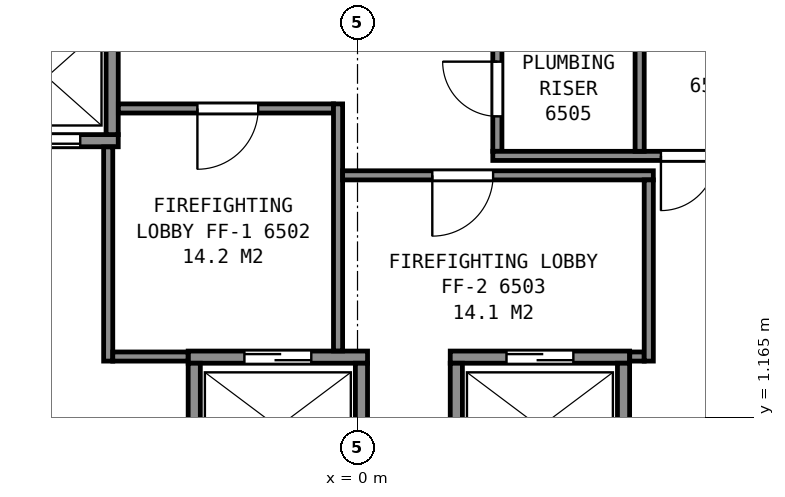
"""IFC4 building model, lengths in metres.
Left out: names, types, materials, properties, quantities, classifications, styles, units other than length and angle.
Written with IfcOpenShell. Run it as: python <this file> out.ifc"""

import sys

from ifc_helpers import new_model, si_unit, direction, frame, frame_2d, origin, origin_2d, place, context, subcontext, project, spatial, rectangle, i_section, extrude, element, fill, save


model = new_model("IFC4")
c1 = context("Model", 3, precision=1e-05, world=origin(), true_north=direction((0.0, 1.0)))
c2 = subcontext(c1, "Body", "Model", "MODEL_VIEW")
j1 = project(units=[si_unit("LENGTHUNIT", "METRE"), si_unit("PLANEANGLEUNIT", "RADIAN")], contexts=[c1])
p1 = place(None, origin())
s1 = spatial("IfcSite", under=j1, at=p1, CompositionType="ELEMENT")
p2 = place(p1, origin())
s2 = spatial("IfcBuilding", under=s1, at=p2, CompositionType="ELEMENT")
p3 = place(p2, frame((0.0, 0.0, 258.2)))
s3 = spatial("IfcBuildingStorey", under=s2, at=p3, CompositionType="ELEMENT", Elevation=258.2)
p4 = place(p3, frame((0.0, 7.994, 0.03), z_axis=(0.0, -0.202631772336, 0.979255005012), x_axis=(1.0, 0.0, 0.0)))
e1 = element("IfcColumn", 1, at=p4, inside=s3, PredefinedType="COLUMN", context=c2, shape_type="SweptSolid", body=[
    extrude(i_section(OverallWidth=0.399, OverallDepth=0.386, WebThickness=0.021, FlangeThickness=0.033, FilletRadius=0.015, at=origin_2d()), origin(), (0.0, 0.0, 1.0), 5.862),
])
p5 = place(p3, frame((-2.785, 2.15, 0.0), z_axis=(0.0, 0.0, 1.0), x_axis=(1.0, 0.0, 0.0)))
e2 = element("IfcWall", 2, at=p5, inside=s3, PredefinedType="PARTITIONING", context=c2, shape_type="SweptSolid", body=[
    extrude(rectangle(XDim=2.95, YDim=0.2, at=frame_2d((1.475, 0.0))), origin(), (0.0, 0.0, 1.0), 5.8),
])
p6 = place(p5, frame((0.925, 0.0, 0.0)))
e3 = element("IfcOpeningElement", 3, at=p6, cuts=e2, PredefinedType="OPENING", context=c2, shape_type="SweptSolid", body=[
    extrude(rectangle(XDim=1.1, YDim=2.1, at=frame_2d((0.55, 1.05))), frame((0.0, 0.11, 0.0), z_axis=(0.0, -1.0, 0.0), x_axis=(1.0, 0.0, 0.0)), (0.0, 0.0, 1.0), 0.22),
])
p7 = place(p3, frame((1.525, 2.15, 0.0), z_axis=(0.0, 0.0, 1.0), x_axis=(1.0, 0.0, 0.0)))
e4 = element("IfcWall", 4, at=p7, inside=s3, PredefinedType="PARTITIONING", context=c2, shape_type="SweptSolid", body=[
    extrude(rectangle(XDim=2.95, YDim=0.2, at=frame_2d((1.475, 0.0))), origin(), (0.0, 0.0, 1.0), 5.8),
])
p8 = place(p7, frame((0.925, 0.0, 0.0)))
e5 = element("IfcOpeningElement", 5, at=p8, cuts=e4, PredefinedType="OPENING", context=c2, shape_type="SweptSolid", body=[
    extrude(rectangle(XDim=1.1, YDim=2.1, at=frame_2d((0.55, 1.05))), frame((0.0, 0.11, 0.0), z_axis=(0.0, -1.0, 0.0), x_axis=(1.0, 0.0, 0.0)), (0.0, 0.0, 1.0), 0.22),
])
p9 = place(p3, frame((-6.285, 5.71, 0.0), z_axis=(0.0, 0.0, 1.0), x_axis=(1.0, 0.0, 0.0)))
e6 = element("IfcWall", 6, at=p9, inside=s3, PredefinedType="PARTITIONING", context=c2, shape_type="SweptSolid", body=[
    extrude(rectangle(XDim=2.35, YDim=0.2, at=frame_2d((1.175, 0.0))), origin(), (0.0, 0.0, 1.0), 5.55),
])
p10 = place(p9, frame((0.625, 0.0, 0.0)))
e7 = element("IfcOpeningElement", 7, at=p10, cuts=e6, PredefinedType="OPENING", context=c2, shape_type="SweptSolid", body=[
    extrude(rectangle(XDim=1.1, YDim=2.1, at=frame_2d((0.55, 1.05))), frame((0.0, 0.11, 0.0), z_axis=(0.0, -1.0, 0.0), x_axis=(1.0, 0.0, 0.0)), (0.0, 0.0, 1.0), 0.22),
])
p11 = place(p3, frame((5.663, -1.612, 0.0), z_axis=(0.0, 0.0, 1.0), x_axis=(0.49998122708, 0.866036242063, 0.0)))
e8 = element("IfcWall", 8, at=p11, inside=s3, PredefinedType="PARTITIONING", context=c2, shape_type="SweptSolid", body=[
    extrude(rectangle(XDim=4.9, YDim=0.2, at=frame_2d((2.45, 0.0))), origin(), (0.0, 0.0, 1.0), 5.55),
])
p12 = place(p11, frame((3.075, 0.0, 0.0)))
e9 = element("IfcOpeningElement", 9, at=p12, cuts=e8, PredefinedType="OPENING", context=c2, shape_type="SweptSolid", body=[
    extrude(rectangle(XDim=1.1, YDim=2.1, at=frame_2d((0.55, 1.05))), frame((0.0, 0.11, 0.0), z_axis=(0.0, -1.0, 0.0), x_axis=(1.0, 0.0, 0.0)), (0.0, 0.0, 1.0), 0.22),
])
p13 = place(p11, frame((0.725, 0.0, 0.0)))
e10 = element("IfcOpeningElement", 10, at=p13, cuts=e8, PredefinedType="OPENING", context=c2, shape_type="SweptSolid", body=[
    extrude(rectangle(XDim=1.1, YDim=2.1, at=frame_2d((0.55, 1.05))), frame((0.0, 0.11, 0.0), z_axis=(0.0, -1.0, 0.0), x_axis=(1.0, 0.0, 0.0)), (0.0, 0.0, 1.0), 0.22),
])
for number, where, z_axis, x_axis in (
    (11, (4.375, 0.1, 0.0), (0.0, 0.0, 1.0), (0.0, 1.0, 0.0)),
    (12, (1.625, 0.1, 0.0), (0.0, 0.0, 1.0), (0.0, 1.0, 0.0)),
    (13, (0.065, 0.1, 0.0), (0.0, 0.0, 1.0), (0.0, 1.0, 0.0)),
    (14, (-2.685, 0.1, 0.0), (0.0, 0.0, 1.0), (0.0, 1.0, 0.0)),
):
    element("IfcWall", number, at=place(p3, frame(where, z_axis=z_axis, x_axis=x_axis)), inside=s3, PredefinedType="PARTITIONING", context=c2, shape_type="SweptSolid", body=[
        extrude(rectangle(XDim=1.95, YDim=0.2, at=frame_2d((0.975, 0.0))), origin(), (0.0, 0.0, 1.0), 5.8),
    ])
p14 = place(p3, frame((-4.035, 5.81, 0.0), z_axis=(0.0, 0.0, 1.0), x_axis=(0.0, 1.0, 0.0)))
e15 = element("IfcWall", 15, at=p14, inside=s3, PredefinedType="PARTITIONING", context=c2, shape_type="SweptSolid", body=[
    extrude(rectangle(XDim=1.75, YDim=0.2, at=frame_2d((0.875, 0.0))), origin(), (0.0, 0.0, 1.0), 4.897),
])
p15 = place(p3, frame((-4.1, 2.085, 0.0), z_axis=(0.0, 0.0, 1.0), x_axis=(0.0, 1.0, 0.0)))
e16 = element("IfcWall", 16, at=p15, inside=s3, PredefinedType="PARTITIONING", context=c2, shape_type="SweptSolid", body=[
    extrude(rectangle(XDim=3.523, YDim=0.15, at=frame_2d((1.761, 0.0))), origin(), (0.0, 0.0, 1.0), 5.55),
])
p16 = place(p3, frame((-4.025, 2.16, 0.0), z_axis=(0.0, 0.0, 1.0), x_axis=(1.0, 0.0, 0.0)))
e17 = element("IfcWall", 17, at=p16, inside=s3, PredefinedType="PARTITIONING", context=c2, shape_type="SweptSolid", body=[
    extrude(rectangle(XDim=1.238, YDim=0.15, at=frame_2d((0.619, 0.0))), origin(), (0.0, 0.0, 1.0), 5.55),
])
p17 = place(p3, frame((-3.933, 6.24, 0.0), z_axis=(0.0, 0.0, 1.0), x_axis=(1.0, 0.0, 0.0)))
e18 = element("IfcWall", 18, at=p17, inside=s3, PredefinedType="PARTITIONING", context=c2, shape_type="SweptSolid", body=[
    extrude(rectangle(XDim=3.538, YDim=0.15, at=frame_2d((1.769, 0.0))), origin(), (0.0, 0.0, 1.0), 5.55),
])
p18 = place(p17, frame((1.3, 0.0, 0.0)))
e19 = element("IfcOpeningElement", 19, at=p18, cuts=e18, PredefinedType="OPENING", context=c2, shape_type="SweptSolid", body=[
    extrude(rectangle(XDim=1.0, YDim=2.1, at=frame_2d((0.5, 1.05))), frame((0.0, 0.085, 0.0), z_axis=(0.0, -1.0, 0.0), x_axis=(1.0, 0.0, 0.0)), (0.0, 0.0, 1.0), 0.17),
])
p19 = place(p3, frame((-0.32, 2.252, 0.0), z_axis=(0.0, 0.0, 1.0), x_axis=(0.0, 1.0, 0.0)))
e20 = element("IfcWall", 20, at=p19, inside=s3, PredefinedType="PARTITIONING", context=c2, shape_type="SweptSolid", body=[
    extrude(rectangle(XDim=4.063, YDim=0.15, at=frame_2d((2.031, 0.0))), origin(), (0.0, 0.0, 1.0), 5.55),
])
p20 = place(p3, frame((-0.245, 5.14, 0.0), z_axis=(0.0, 0.0, 1.0), x_axis=(1.0, 0.0, 0.0)))
e21 = element("IfcWall", 21, at=p20, inside=s3, PredefinedType="PARTITIONING", context=c2, shape_type="SweptSolid", body=[
    extrude(rectangle(XDim=5.11, YDim=0.15, at=frame_2d((2.555, 0.0))), origin(), (0.0, 0.0, 1.0), 5.55),
])
p21 = place(p20, frame((1.475, 0.0, 0.0)))
e22 = element("IfcOpeningElement", 22, at=p21, cuts=e21, PredefinedType="OPENING", context=c2, shape_type="SweptSolid", body=[
    extrude(rectangle(XDim=1.0, YDim=2.1, at=frame_2d((0.5, 1.05))), frame((0.0, 0.085, 0.0), z_axis=(0.0, -1.0, 0.0), x_axis=(1.0, 0.0, 0.0)), (0.0, 0.0, 1.0), 0.17),
])
p22 = place(p3, frame((2.3, 7.56, 0.0), z_axis=(0.0, 0.0, 1.0), x_axis=(0.0, -1.0, 0.0)))
e23 = element("IfcWall", 23, at=p22, inside=s3, PredefinedType="PARTITIONING", context=c2, shape_type="SweptSolid", body=[
    extrude(rectangle(XDim=2.025, YDim=0.15, at=frame_2d((1.013, 0.0))), origin(), (0.0, 0.0, 1.0), 4.933),
])
p23 = place(p22, frame((0.55, 0.0, 0.0)))
e24 = element("IfcOpeningElement", 24, at=p23, cuts=e23, PredefinedType="OPENING", context=c2, shape_type="SweptSolid", body=[
    extrude(rectangle(XDim=0.9, YDim=2.1, at=frame_2d((0.45, 1.05))), frame((0.0, 0.085, 0.0), z_axis=(0.0, -1.0, 0.0), x_axis=(1.0, 0.0, 0.0)), (0.0, 0.0, 1.0), 0.17),
])
p24 = place(p3, frame((2.225, 5.46, 0.0), z_axis=(0.0, 0.0, 1.0), x_axis=(1.0, 0.0, 0.0)))
e25 = element("IfcWall", 25, at=p24, inside=s3, PredefinedType="PARTITIONING", context=c2, shape_type="SweptSolid", body=[
    extrude(rectangle(XDim=3.916, YDim=0.15, at=frame_2d((1.958, 0.0))), origin(), (0.0, 0.0, 1.0), 5.55),
])
p25 = place(p24, frame((2.765, 0.0, 0.0)))
e26 = element("IfcOpeningElement", 26, at=p25, cuts=e25, PredefinedType="OPENING", context=c2, shape_type="SweptSolid", body=[
    extrude(rectangle(XDim=0.9, YDim=2.1, at=frame_2d((0.45, 1.05))), frame((0.0, 0.085, 0.0), z_axis=(0.0, -1.0, 0.0), x_axis=(1.0, 0.0, 0.0)), (0.0, 0.0, 1.0), 0.17),
])
p26 = place(p3, frame((4.477, 2.16, 0.0), z_axis=(0.0, 0.0, 1.0), x_axis=(1.0, 0.0, 0.0)))
e27 = element("IfcWall", 27, at=p26, inside=s3, PredefinedType="PARTITIONING", context=c2, shape_type="SweptSolid", body=[
    extrude(rectangle(XDim=0.238, YDim=0.15, at=frame_2d((0.119, 0.0))), origin(), (0.0, 0.0, 1.0), 5.55),
])
p27 = place(p3, frame((4.64, 5.535, 0.0), z_axis=(0.0, 0.0, 1.0), x_axis=(0.0, 1.0, 0.0)))
e28 = element("IfcWall", 28, at=p27, inside=s3, PredefinedType="PARTITIONING", context=c2, shape_type="SweptSolid", body=[
    extrude(rectangle(XDim=2.025, YDim=0.15, at=frame_2d((1.013, 0.0))), origin(), (0.0, 0.0, 1.0), 4.933),
])
p28 = place(p3, frame((4.79, 2.085, 0.0), z_axis=(0.0, 0.0, 1.0), x_axis=(0.0, 1.0, 0.0)))
e29 = element("IfcWall", 29, at=p28, inside=s3, PredefinedType="PARTITIONING", context=c2, shape_type="SweptSolid", body=[
    extrude(rectangle(XDim=2.98, YDim=0.15, at=frame_2d((1.49, 0.0))), origin(), (0.0, 0.0, 1.0), 5.55),
])
p29 = place(p3, frame((-13.605, 3.965, 0.0), z_axis=(0.0, 0.0, 1.0), x_axis=(0.499986289957, -0.866033319137, 0.0)))
e30 = element("IfcWall", 30, at=p29, inside=s3, PredefinedType="PARTITIONING", context=c2, shape_type="SweptSolid", body=[
    extrude(rectangle(XDim=19.731, YDim=0.125, at=frame_2d((9.866, 0.0))), origin(), (0.0, 0.0, 1.0), 4.462),
])
p30 = place(p3, frame((13.605, 3.965, 0.0), z_axis=(0.0, 0.0, 1.0), x_axis=(-0.499986289957, -0.866033319137, 0.0)))
e31 = element("IfcWall", 31, at=p30, inside=s3, PredefinedType="PARTITIONING", context=c2, shape_type="SweptSolid", body=[
    extrude(rectangle(XDim=19.731, YDim=0.125, at=frame_2d((9.866, 0.0))), origin(), (0.0, 0.0, 1.0), 4.462),
])
p31 = place(p30, frame((9.269, 0.0, 0.0)))
e32 = element("IfcOpeningElement", 32, at=p31, cuts=e31, PredefinedType="OPENING", context=c2, shape_type="SweptSolid", body=[
    extrude(rectangle(XDim=1.5, YDim=2.1, at=frame_2d((0.75, 1.05))), frame((0.0, 0.073, 0.0), z_axis=(0.0, -1.0, 0.0), x_axis=(1.0, 0.0, 0.0)), (0.0, 0.0, 1.0), 0.145),
])
p32 = place(p10, origin())
e33 = element("IfcDoor", 33, at=p32, inside=s3, OperationType="SLIDING_TO_RIGHT", PredefinedType="DOOR", context=c2, shape_type="SweptSolid", body=[
    extrude(rectangle(XDim=1.1, YDim=2.1, at=frame_2d((0.55, 1.05))), frame((0.0, 0.025, 0.0), z_axis=(0.0, -1.0, 0.0), x_axis=(1.0, 0.0, 0.0)), (0.0, 0.0, 1.0), 0.05),
])
fill(e7, e33)
p33 = place(p6, origin())
e34 = element("IfcDoor", 34, at=p33, inside=s3, OperationType="SLIDING_TO_LEFT", PredefinedType="DOOR", context=c2, shape_type="SweptSolid", body=[
    extrude(rectangle(XDim=1.1, YDim=2.1, at=frame_2d((0.55, 1.05))), frame((0.0, 0.025, 0.0), z_axis=(0.0, -1.0, 0.0), x_axis=(1.0, 0.0, 0.0)), (0.0, 0.0, 1.0), 0.05),
])
fill(e3, e34)
p34 = place(p8, origin())
e35 = element("IfcDoor", 35, at=p34, inside=s3, OperationType="SLIDING_TO_RIGHT", PredefinedType="DOOR", context=c2, shape_type="SweptSolid", body=[
    extrude(rectangle(XDim=1.1, YDim=2.1, at=frame_2d((0.55, 1.05))), frame((0.0, 0.025, 0.0), z_axis=(0.0, -1.0, 0.0), x_axis=(1.0, 0.0, 0.0)), (0.0, 0.0, 1.0), 0.05),
])
fill(e5, e35)
p35 = place(p18, origin())
e36 = element("IfcDoor", 36, at=p35, inside=s3, OperationType="SINGLE_SWING_LEFT", PredefinedType="DOOR", context=c2, shape_type="SweptSolid", body=[
    extrude(rectangle(XDim=1.0, YDim=2.1, at=frame_2d((0.5, 1.05))), frame((0.0, 0.025, 0.0), z_axis=(0.0, -1.0, 0.0), x_axis=(1.0, 0.0, 0.0)), (0.0, 0.0, 1.0), 0.05),
])
fill(e19, e36)
p36 = place(p21, origin())
e37 = element("IfcDoor", 37, at=p36, inside=s3, OperationType="SINGLE_SWING_LEFT", PredefinedType="DOOR", context=c2, shape_type="SweptSolid", body=[
    extrude(rectangle(XDim=1.0, YDim=2.1, at=frame_2d((0.5, 1.05))), frame((0.0, 0.025, 0.0), z_axis=(0.0, -1.0, 0.0), x_axis=(1.0, 0.0, 0.0)), (0.0, 0.0, 1.0), 0.05),
])
fill(e22, e37)
p37 = place(p23, origin())
e38 = element("IfcDoor", 38, at=p37, inside=s3, OperationType="SINGLE_SWING_LEFT", PredefinedType="DOOR", context=c2, shape_type="SweptSolid", body=[
    extrude(rectangle(XDim=0.9, YDim=2.1, at=frame_2d((0.45, 1.05))), frame((0.0, 0.025, 0.0), z_axis=(0.0, -1.0, 0.0), x_axis=(1.0, 0.0, 0.0)), (0.0, 0.0, 1.0), 0.05),
])
fill(e24, e38)
p38 = place(p25, origin())
e39 = element("IfcDoor", 39, at=p38, inside=s3, OperationType="SINGLE_SWING_LEFT", PredefinedType="DOOR", context=c2, shape_type="SweptSolid", body=[
    extrude(rectangle(XDim=0.9, YDim=2.1, at=frame_2d((0.45, 1.05))), frame((0.0, 0.025, 0.0), z_axis=(0.0, -1.0, 0.0), x_axis=(1.0, 0.0, 0.0)), (0.0, 0.0, 1.0), 0.05),
])
fill(e26, e39)
save(model, sys.argv[1])
